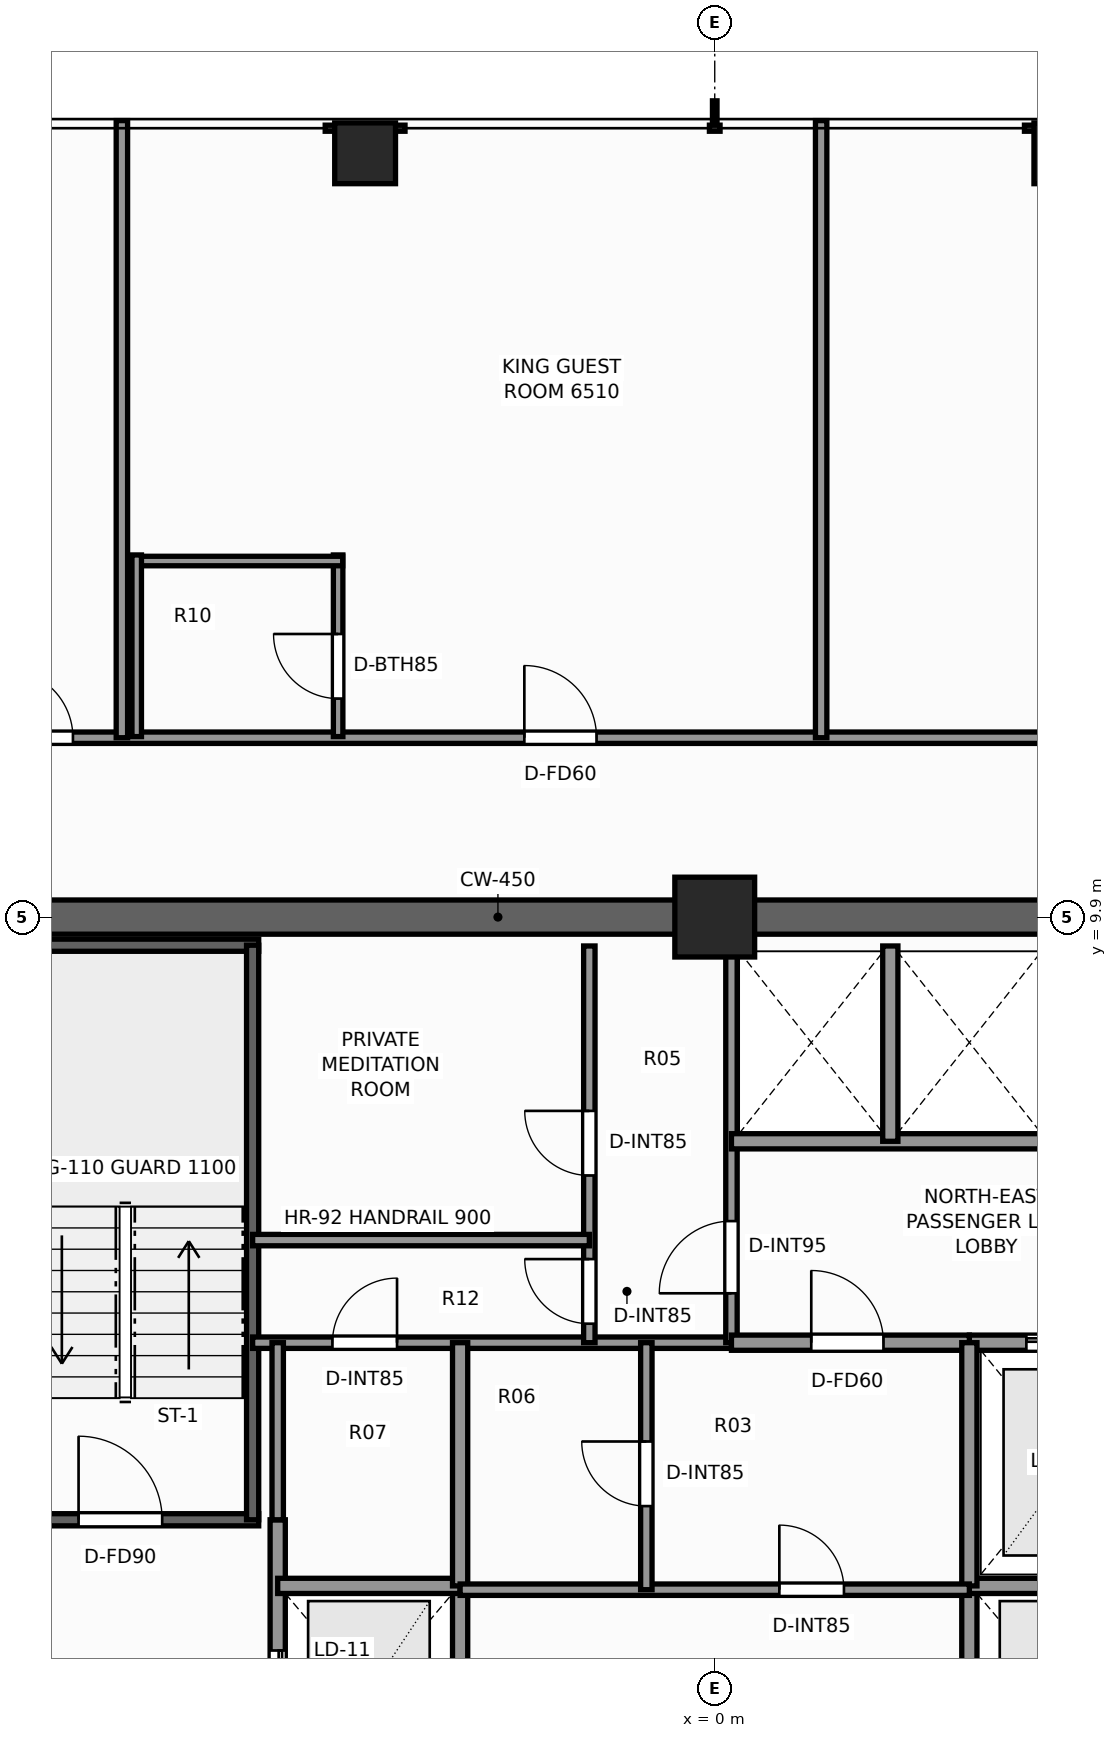
"""IFC4 building model, lengths in metres.
Left out: names, types, materials, properties, quantities, classifications, styles, units other than length and angle.
Written with IfcOpenShell. Run it as: python <this file> out.ifc"""

import sys

from ifc_helpers import new_model, si_unit, direction, frame, frame_2d, origin, origin_2d, place, context, subcontext, project, spatial, rectangle, extrude, element, fill, save


model = new_model("IFC4")
c1 = context("Model", 3, precision=1e-05, world=origin(), true_north=direction((0.0, 1.0)))
c2 = subcontext(c1, "Body", "Model", "MODEL_VIEW")
j1 = project(units=[si_unit("LENGTHUNIT", "METRE"), si_unit("PLANEANGLEUNIT", "RADIAN")], contexts=[c1])
p1 = place(None, origin())
s1 = spatial("IfcSite", under=j1, at=p1, CompositionType="ELEMENT")
p2 = place(p1, origin())
s2 = spatial("IfcBuilding", under=s1, at=p2, CompositionType="ELEMENT")
p3 = place(p2, frame((0.0, 0.0, 222.9)))
s3 = spatial("IfcBuildingStorey", under=s2, at=p3, CompositionType="ELEMENT", Elevation=222.9)
p4 = place(p3, frame((-10.125, 9.9, 0.0), z_axis=(0.0, 0.0, 1.0), x_axis=(1.0, 0.0, 0.0)))
e1 = element("IfcWall", 1, at=p4, inside=s3, PredefinedType="SHEAR", context=c2, shape_type="SweptSolid", body=[
    extrude(rectangle(XDim=14.545, YDim=0.45, at=frame_2d((7.272, 0.0))), origin(), (0.0, 0.0, 1.0), 3.3),
])
p5 = place(p3, frame((0.0, 9.9, 0.0), z_axis=(0.0, 0.0, 1.0), x_axis=(1.0, 0.0, 0.0)))
e2 = element("IfcColumn", 2, at=p5, inside=s3, PredefinedType="COLUMN", context=c2, shape_type="SweptSolid", body=[
    extrude(rectangle(XDim=1.05, YDim=1.05, at=origin_2d()), origin(), (0.0, 0.0, 1.0), 3.3),
])
for number, where, z_axis, x_axis in (
    (3, (-4.6, 19.95, 0.0), (0.0, 0.0, 1.0), (1.0, 0.0, 0.0)),
    (4, (4.6, 19.95, 0.0), (0.0, 0.0, 1.0), (1.0, 0.0, 0.0)),
):
    element("IfcColumn", number, at=place(p3, frame(where, z_axis=z_axis, x_axis=x_axis)), inside=s3, PredefinedType="COLUMN", context=c2, shape_type="SweptSolid", body=[
        extrude(rectangle(XDim=0.8, YDim=0.8, at=origin_2d()), origin(), (0.0, 0.0, 1.0), 3.3),
    ])
p6 = place(p3, frame((-9.52, 1.97, 0.0), z_axis=(0.0, 0.0, 1.0), x_axis=(1.0, 0.0, 0.0)))
e5 = element("IfcWall", 5, at=p6, inside=s3, PredefinedType="SHEAR", context=c2, shape_type="SweptSolid", body=[
    extrude(rectangle(XDim=3.52, YDim=0.16, at=frame_2d((1.76, 0.0))), origin(), (0.0, 0.0, 1.0), 3.3),
])
p7 = place(p6, frame((1.15, 0.0, 0.0)))
e6 = element("IfcOpeningElement", 6, at=p7, cuts=e5, PredefinedType="OPENING", context=c2, shape_type="SweptSolid", body=[
    extrude(rectangle(XDim=1.1, YDim=2.2, at=frame_2d((0.55, 1.1))), frame((0.0, 0.09, 0.0), z_axis=(0.0, -1.0, 0.0), x_axis=(1.0, 0.0, 0.0)), (0.0, 0.0, 1.0), 0.18),
])
p8 = place(p3, frame((-9.52, 9.53, 0.0), z_axis=(0.0, 0.0, 1.0), x_axis=(1.0, 0.0, 0.0)))
e7 = element("IfcWall", 7, at=p8, inside=s3, PredefinedType="SHEAR", context=c2, shape_type="SweptSolid", body=[
    extrude(rectangle(XDim=3.52, YDim=0.16, at=frame_2d((1.76, 0.0))), origin(), (0.0, 0.0, 1.0), 3.3),
])
p9 = place(p3, frame((-6.08, 1.97, 0.0), z_axis=(0.0, 0.0, 1.0), x_axis=(0.0, 1.0, 0.0)))
e8 = element("IfcWall", 8, at=p9, inside=s3, PredefinedType="SHEAR", context=c2, shape_type="SweptSolid", body=[
    extrude(rectangle(XDim=7.56, YDim=0.16, at=frame_2d((3.78, 0.0))), origin(), (0.0, 0.0, 1.0), 3.3),
])
p10 = place(p3, frame((-5.75, -3.6, 0.0), z_axis=(0.0, 0.0, 1.0), x_axis=(0.0, 1.0, 0.0)))
e9 = element("IfcWall", 9, at=p10, inside=s3, PredefinedType="SOLIDWALL", context=c2, shape_type="SweptSolid", body=[
    extrude(rectangle(XDim=5.57, YDim=0.2, at=frame_2d((2.785, 0.0))), origin(), (0.0, 0.0, 1.0), 3.08),
])
p11 = place(p10, frame((2.75, 0.0, 0.0)))
e10 = element("IfcOpeningElement", 10, at=p11, cuts=e9, PredefinedType="OPENING", context=c2, shape_type="SweptSolid", body=[
    extrude(rectangle(XDim=1.1, YDim=2.2, at=frame_2d((0.55, 1.1))), frame((0.0, 0.11, 0.0), z_axis=(0.0, -1.0, 0.0), x_axis=(1.0, 0.0, 0.0)), (0.0, 0.0, 1.0), 0.22),
])
p12 = place(p3, frame((-3.35, -1.7, 0.0), z_axis=(0.0, 0.0, 1.0), x_axis=(0.0, 1.0, 0.0)))
e11 = element("IfcWall", 11, at=p12, inside=s3, PredefinedType="SOLIDWALL", context=c2, shape_type="SweptSolid", body=[
    extrude(rectangle(XDim=2.8, YDim=0.2, at=frame_2d((1.4, 0.0))), origin(), (0.0, 0.0, 1.0), 3.08),
])
p13 = place(p3, frame((-5.75, 1.1, 0.0), z_axis=(0.0, 0.0, 1.0), x_axis=(1.0, 0.0, 0.0)))
e12 = element("IfcWall", 12, at=p13, inside=s3, PredefinedType="SOLIDWALL", context=c2, shape_type="SweptSolid", body=[
    extrude(rectangle(XDim=2.4, YDim=0.2, at=frame_2d((1.2, 0.0))), origin(), (0.0, 0.0, 1.0), 3.08),
])
p14 = place(p3, frame((3.35, -1.7, 0.0), z_axis=(0.0, 0.0, 1.0), x_axis=(0.0, 1.0, 0.0)))
e13 = element("IfcWall", 13, at=p14, inside=s3, PredefinedType="SOLIDWALL", context=c2, shape_type="SweptSolid", body=[
    extrude(rectangle(XDim=2.8, YDim=0.2, at=frame_2d((1.4, 0.0))), origin(), (0.0, 0.0, 1.0), 3.08),
])
p15 = place(p3, frame((3.35, 1.1, 0.0), z_axis=(0.0, 0.0, 1.0), x_axis=(1.0, 0.0, 0.0)))
e14 = element("IfcWall", 14, at=p15, inside=s3, PredefinedType="SOLIDWALL", context=c2, shape_type="SweptSolid", body=[
    extrude(rectangle(XDim=2.4, YDim=0.2, at=frame_2d((1.2, 0.0))), origin(), (0.0, 0.0, 1.0), 3.08),
])
p16 = place(p3, frame((3.35, 4.3, 0.0), z_axis=(0.0, 0.0, 1.0), x_axis=(1.0, 0.0, 0.0)))
e15 = element("IfcWall", 15, at=p16, inside=s3, PredefinedType="SOLIDWALL", context=c2, shape_type="SweptSolid", body=[
    extrude(rectangle(XDim=2.73, YDim=0.2, at=frame_2d((1.365, 0.0))), origin(), (0.0, 0.0, 1.0), 3.08),
])
p17 = place(p16, frame((0.75, 0.0, 0.0)))
e16 = element("IfcOpeningElement", 16, at=p17, cuts=e15, PredefinedType="OPENING", context=c2, shape_type="SweptSolid", body=[
    extrude(rectangle(XDim=1.2, YDim=2.25, at=frame_2d((0.6, 1.125))), frame((0.0, 0.11, 0.0), z_axis=(0.0, -1.0, 0.0), x_axis=(1.0, 0.0, 0.0)), (0.0, 0.0, 1.0), 0.22),
])
p18 = place(p3, frame((-6.08, 4.3, 0.0), z_axis=(0.0, 0.0, 1.0), x_axis=(1.0, 0.0, 0.0)))
e17 = element("IfcWall", 17, at=p18, inside=s3, PredefinedType="PARTITIONING", context=c2, shape_type="SweptSolid", body=[
    extrude(rectangle(XDim=6.3, YDim=0.15, at=frame_2d((3.15, 0.0))), origin(), (0.0, 0.0, 1.0), 3.08),
])
p19 = place(p18, frame((1.05, 0.0, 0.0)))
e18 = element("IfcOpeningElement", 18, at=p19, cuts=e17, PredefinedType="OPENING", context=c2, shape_type="SweptSolid", body=[
    extrude(rectangle(XDim=0.85, YDim=2.03, at=frame_2d((0.425, 1.015))), frame((0.0, 0.085, 0.0), z_axis=(0.0, -1.0, 0.0), x_axis=(1.0, 0.0, 0.0)), (0.0, 0.0, 1.0), 0.17),
])
p20 = place(p3, frame((0.22, 4.3, 0.0), z_axis=(0.0, 0.0, 1.0), x_axis=(0.0, 1.0, 0.0)))
e19 = element("IfcWall", 19, at=p20, inside=s3, PredefinedType="PARTITIONING", context=c2, shape_type="SweptSolid", body=[
    extrude(rectangle(XDim=5.22, YDim=0.15, at=frame_2d((2.61, 0.0))), origin(), (0.0, 0.0, 1.0), 3.08),
])
p21 = place(p20, frame((0.65, 0.0, 0.0)))
e20 = element("IfcOpeningElement", 20, at=p21, cuts=e19, PredefinedType="OPENING", context=c2, shape_type="SweptSolid", body=[
    extrude(rectangle(XDim=0.95, YDim=2.06, at=frame_2d((0.475, 1.03))), frame((0.0, 0.085, 0.0), z_axis=(0.0, -1.0, 0.0), x_axis=(1.0, 0.0, 0.0)), (0.0, 0.0, 1.0), 0.17),
])
p22 = place(p3, frame((-1.65, 4.3, 0.0), z_axis=(0.0, 0.0, 1.0), x_axis=(0.0, 1.0, 0.0)))
e21 = element("IfcWall", 21, at=p22, inside=s3, PredefinedType="PARTITIONING", context=c2, shape_type="SweptSolid", body=[
    extrude(rectangle(XDim=5.22, YDim=0.15, at=frame_2d((2.61, 0.0))), origin(), (0.0, 0.0, 1.0), 3.08),
])
p23 = place(p22, frame((2.2, 0.0, 0.0)))
e22 = element("IfcOpeningElement", 22, at=p23, cuts=e21, PredefinedType="OPENING", context=c2, shape_type="SweptSolid", body=[
    extrude(rectangle(XDim=0.85, YDim=2.03, at=frame_2d((0.425, 1.015))), frame((0.0, 0.085, 0.0), z_axis=(0.0, -1.0, 0.0), x_axis=(1.0, 0.0, 0.0)), (0.0, 0.0, 1.0), 0.17),
])
p24 = place(p22, frame((0.25, 0.0, 0.0)))
e23 = element("IfcOpeningElement", 23, at=p24, cuts=e21, PredefinedType="OPENING", context=c2, shape_type="SweptSolid", body=[
    extrude(rectangle(XDim=0.85, YDim=2.03, at=frame_2d((0.425, 1.015))), frame((0.0, 0.085, 0.0), z_axis=(0.0, -1.0, 0.0), x_axis=(1.0, 0.0, 0.0)), (0.0, 0.0, 1.0), 0.17),
])
p25 = place(p3, frame((-6.08, 5.65, 0.0), z_axis=(0.0, 0.0, 1.0), x_axis=(1.0, 0.0, 0.0)))
e24 = element("IfcWall", 24, at=p25, inside=s3, PredefinedType="PARTITIONING", context=c2, shape_type="SweptSolid", body=[
    extrude(rectangle(XDim=4.43, YDim=0.15, at=frame_2d((2.215, 0.0))), origin(), (0.0, 0.0, 1.0), 3.08),
])
p26 = place(p3, frame((0.22, 6.95, 0.0), z_axis=(0.0, 0.0, 1.0), x_axis=(1.0, 0.0, 0.0)))
e25 = element("IfcWall", 25, at=p26, inside=s3, PredefinedType="SOLIDWALL", context=c2, shape_type="SweptSolid", body=[
    extrude(rectangle(XDim=4.18, YDim=0.2, at=frame_2d((2.09, 0.0))), origin(), (0.0, 0.0, 1.0), 3.08),
])
p27 = place(p3, frame((2.31, 6.95, 0.0), z_axis=(0.0, 0.0, 1.0), x_axis=(0.0, 1.0, 0.0)))
e26 = element("IfcWall", 26, at=p27, inside=s3, PredefinedType="SOLIDWALL", context=c2, shape_type="SweptSolid", body=[
    extrude(rectangle(XDim=2.57, YDim=0.2, at=frame_2d((1.285, 0.0))), origin(), (0.0, 0.0, 1.0), 3.08),
])
p28 = place(p3, frame((0.22, 4.3, 0.0), z_axis=(0.0, 0.0, 1.0), x_axis=(1.0, 0.0, 0.0)))
e27 = element("IfcWall", 27, at=p28, inside=s3, PredefinedType="SOLIDWALL", context=c2, shape_type="SweptSolid", body=[
    extrude(rectangle(XDim=3.13, YDim=0.2, at=frame_2d((1.565, 0.0))), origin(), (0.0, 0.0, 1.0), 3.08),
])
p29 = place(p28, frame((1.05, 0.0, 0.0)))
e28 = element("IfcOpeningElement", 28, at=p29, cuts=e27, PredefinedType="OPENING", context=c2, shape_type="SweptSolid", body=[
    extrude(rectangle(XDim=0.95, YDim=2.06, at=frame_2d((0.475, 1.03))), frame((0.0, 0.11, 0.0), z_axis=(0.0, -1.0, 0.0), x_axis=(1.0, 0.0, 0.0)), (0.0, 0.0, 1.0), 0.22),
])
for number, where, z_axis, x_axis in (
    (29, (-3.35, 1.1, 0.0), (0.0, 0.0, 1.0), (0.0, 1.0, 0.0)),
    (30, (3.35, 1.1, 0.0), (0.0, 0.0, 1.0), (0.0, 1.0, 0.0)),
):
    element("IfcWall", number, at=place(p3, frame(where, z_axis=z_axis, x_axis=x_axis)), inside=s3, PredefinedType="SOLIDWALL", context=c2, shape_type="SweptSolid", body=[
        extrude(rectangle(XDim=3.2, YDim=0.2, at=frame_2d((1.6, 0.0))), origin(), (0.0, 0.0, 1.0), 3.08),
    ])
p30 = place(p3, frame((-3.35, 1.05, 0.0), z_axis=(0.0, 0.0, 1.0), x_axis=(1.0, 0.0, 0.0)))
e31 = element("IfcWall", 31, at=p30, inside=s3, PredefinedType="PARTITIONING", context=c2, shape_type="SweptSolid", body=[
    extrude(rectangle(XDim=6.7, YDim=0.15, at=frame_2d((3.35, 0.0))), origin(), (0.0, 0.0, 1.0), 3.08),
])
p31 = place(p30, frame((4.2, 0.0, 0.0)))
e32 = element("IfcOpeningElement", 32, at=p31, cuts=e31, PredefinedType="OPENING", context=c2, shape_type="SweptSolid", body=[
    extrude(rectangle(XDim=0.85, YDim=2.03, at=frame_2d((0.425, 1.015))), frame((0.0, 0.085, 0.0), z_axis=(0.0, -1.0, 0.0), x_axis=(1.0, 0.0, 0.0)), (0.0, 0.0, 1.0), 0.17),
])
p32 = place(p3, frame((-0.9, 1.05, 0.0), z_axis=(0.0, 0.0, 1.0), x_axis=(0.0, 1.0, 0.0)))
e33 = element("IfcWall", 33, at=p32, inside=s3, PredefinedType="PARTITIONING", context=c2, shape_type="SweptSolid", body=[
    extrude(rectangle(XDim=3.25, YDim=0.15, at=frame_2d((1.625, 0.0))), origin(), (0.0, 0.0, 1.0), 3.08),
])
p33 = place(p32, frame((1.1, 0.0, 0.0)))
e34 = element("IfcOpeningElement", 34, at=p33, cuts=e33, PredefinedType="OPENING", context=c2, shape_type="SweptSolid", body=[
    extrude(rectangle(XDim=0.85, YDim=2.03, at=frame_2d((0.425, 1.015))), frame((0.0, 0.085, 0.0), z_axis=(0.0, -1.0, 0.0), x_axis=(1.0, 0.0, 0.0)), (0.0, 0.0, 1.0), 0.17),
])
p34 = place(p3, frame((-5.75, 1.97, 0.0), z_axis=(0.0, 0.0, 1.0), x_axis=(0.0, 1.0, 0.0)))
e35 = element("IfcWall", 35, at=p34, inside=s3, PredefinedType="PARTITIONING", context=c2, shape_type="SweptSolid", body=[
    extrude(rectangle(XDim=2.33, YDim=0.15, at=frame_2d((1.165, 0.0))), origin(), (0.0, 0.0, 1.0), 3.08),
])
p35 = place(p3, frame((-12.26, 12.26, 0.0), z_axis=(0.0, 0.0, 1.0), x_axis=(1.0, 0.0, 0.0)))
e36 = element("IfcWall", 36, at=p35, inside=s3, PredefinedType="PARTITIONING", context=c2, shape_type="SweptSolid", body=[
    extrude(rectangle(XDim=24.52, YDim=0.15, at=frame_2d((12.26, 0.0))), origin(), (0.0, 0.0, 1.0), 2.369),
])
p36 = place(p35, frame((2.916, 0.0, 0.0)))
e37 = element("IfcOpeningElement", 37, at=p36, cuts=e36, PredefinedType="OPENING", context=c2, shape_type="SweptSolid", body=[
    extrude(rectangle(XDim=0.9, YDim=2.06, at=frame_2d((0.45, 1.03))), frame((0.0, 0.085, 0.0), z_axis=(0.0, -1.0, 0.0), x_axis=(1.0, 0.0, 0.0)), (0.0, 0.0, 1.0), 0.17),
])
p37 = place(p35, frame((9.755, 0.0, 0.0)))
e38 = element("IfcOpeningElement", 38, at=p37, cuts=e36, PredefinedType="OPENING", context=c2, shape_type="SweptSolid", body=[
    extrude(rectangle(XDim=0.95, YDim=2.06, at=frame_2d((0.475, 1.03))), frame((0.0, 0.085, 0.0), z_axis=(0.0, -1.0, 0.0), x_axis=(1.0, 0.0, 0.0)), (0.0, 0.0, 1.0), 0.17),
])
p38 = place(p35, frame((19.345, 0.0, 0.0)))
e39 = element("IfcOpeningElement", 39, at=p38, cuts=e36, PredefinedType="OPENING", context=c2, shape_type="SweptSolid", body=[
    extrude(rectangle(XDim=0.9, YDim=2.06, at=frame_2d((0.45, 1.03))), frame((0.0, 0.085, 0.0), z_axis=(0.0, -1.0, 0.0), x_axis=(1.0, 0.0, 0.0)), (0.0, 0.0, 1.0), 0.17),
])
for number, where, z_axis, x_axis in (
    (40, (-7.8, 12.26, 0.0), (0.0, 0.0, 1.0), (0.0, 1.0, 0.0)),
    (41, (1.4, 12.26, 0.0), (0.0, 0.0, 1.0), (0.0, 1.0, 0.0)),
):
    element("IfcWall", number, at=place(p3, frame(where, z_axis=z_axis, x_axis=x_axis)), inside=s3, PredefinedType="PARTITIONING", context=c2, shape_type="SweptSolid", body=[
        extrude(rectangle(XDim=8.12, YDim=0.15, at=frame_2d((4.06, 0.0))), origin(), (0.0, 0.0, 1.0), 2.453),
    ])
p39 = place(p3, frame((-4.955, 12.275, 0.0), z_axis=(0.0, 0.0, 1.0), x_axis=(0.0, 1.0, 0.0)))
e42 = element("IfcWall", 42, at=p39, inside=s3, PredefinedType="PARTITIONING", context=c2, shape_type="SweptSolid", body=[
    extrude(rectangle(XDim=2.39, YDim=0.125, at=frame_2d((1.195, 0.0))), origin(), (0.0, 0.0, 1.0), 3.08),
])
p40 = place(p39, frame((0.5, 0.0, 0.0)))
e43 = element("IfcOpeningElement", 43, at=p40, cuts=e42, PredefinedType="OPENING", context=c2, shape_type="SweptSolid", body=[
    extrude(rectangle(XDim=0.85, YDim=2.03, at=frame_2d((0.425, 1.015))), frame((0.0, 0.073, 0.0), z_axis=(0.0, -1.0, 0.0), x_axis=(1.0, 0.0, 0.0)), (0.0, 0.0, 1.0), 0.145),
])
p41 = place(p3, frame((-7.665, 14.585, 0.0), z_axis=(0.0, 0.0, 1.0), x_axis=(1.0, 0.0, 0.0)))
e44 = element("IfcWall", 44, at=p41, inside=s3, PredefinedType="PARTITIONING", context=c2, shape_type="SweptSolid", body=[
    extrude(rectangle(XDim=2.77, YDim=0.125, at=frame_2d((1.385, 0.0))), origin(), (0.0, 0.0, 1.0), 3.08),
])
p42 = place(p3, frame((-7.605, 12.275, 0.0), z_axis=(0.0, 0.0, 1.0), x_axis=(0.0, 1.0, 0.0)))
e45 = element("IfcWall", 45, at=p42, inside=s3, PredefinedType="PARTITIONING", context=c2, shape_type="SweptSolid", body=[
    extrude(rectangle(XDim=2.39, YDim=0.125, at=frame_2d((1.195, 0.0))), origin(), (0.0, 0.0, 1.0), 3.08),
])
p43 = place(p7, origin())
e46 = element("IfcDoor", 46, at=p43, inside=s3, OperationType="SINGLE_SWING_LEFT", PredefinedType="DOOR", context=c2, shape_type="SweptSolid", body=[
    extrude(rectangle(XDim=1.1, YDim=2.2, at=frame_2d((0.55, 1.1))), frame((0.0, 0.025, 0.0), z_axis=(0.0, -1.0, 0.0), x_axis=(1.0, 0.0, 0.0)), (0.0, 0.0, 1.0), 0.05),
])
fill(e6, e46)
p44 = place(p11, origin())
e47 = element("IfcDoor", 47, at=p44, inside=s3, OperationType="DOUBLE_DOOR_SLIDING", PredefinedType="DOOR", context=c2, shape_type="SweptSolid", body=[
    extrude(rectangle(XDim=1.1, YDim=2.2, at=frame_2d((0.55, 1.1))), frame((0.0, 0.025, 0.0), z_axis=(0.0, -1.0, 0.0), x_axis=(1.0, 0.0, 0.0)), (0.0, 0.0, 1.0), 0.05),
])
fill(e10, e47)
p45 = place(p17, origin())
e48 = element("IfcDoor", 48, at=p45, inside=s3, OperationType="DOUBLE_DOOR_SLIDING", PredefinedType="DOOR", context=c2, shape_type="SweptSolid", body=[
    extrude(rectangle(XDim=1.2, YDim=2.25, at=frame_2d((0.6, 1.125))), frame((0.0, 0.025, 0.0), z_axis=(0.0, -1.0, 0.0), x_axis=(1.0, 0.0, 0.0)), (0.0, 0.0, 1.0), 0.05),
])
fill(e16, e48)
p46 = place(p21, origin())
e49 = element("IfcDoor", 49, at=p46, inside=s3, OperationType="SINGLE_SWING_LEFT", PredefinedType="DOOR", context=c2, shape_type="SweptSolid", body=[
    extrude(rectangle(XDim=0.95, YDim=2.06, at=frame_2d((0.475, 1.03))), frame((0.0, 0.025, 0.0), z_axis=(0.0, -1.0, 0.0), x_axis=(1.0, 0.0, 0.0)), (0.0, 0.0, 1.0), 0.05),
])
fill(e20, e49)
p47 = place(p23, origin())
e50 = element("IfcDoor", 50, at=p47, inside=s3, OperationType="SINGLE_SWING_RIGHT", PredefinedType="DOOR", context=c2, shape_type="SweptSolid", body=[
    extrude(rectangle(XDim=0.85, YDim=2.03, at=frame_2d((0.425, 1.015))), frame((0.0, 0.025, 0.0), z_axis=(0.0, -1.0, 0.0), x_axis=(1.0, 0.0, 0.0)), (0.0, 0.0, 1.0), 0.05),
])
fill(e22, e50)
p48 = place(p24, origin())
e51 = element("IfcDoor", 51, at=p48, inside=s3, OperationType="SINGLE_SWING_RIGHT", PredefinedType="DOOR", context=c2, shape_type="SweptSolid", body=[
    extrude(rectangle(XDim=0.85, YDim=2.03, at=frame_2d((0.425, 1.015))), frame((0.0, 0.025, 0.0), z_axis=(0.0, -1.0, 0.0), x_axis=(1.0, 0.0, 0.0)), (0.0, 0.0, 1.0), 0.05),
])
fill(e23, e51)
p49 = place(p29, origin())
e52 = element("IfcDoor", 52, at=p49, inside=s3, OperationType="SINGLE_SWING_LEFT", PredefinedType="DOOR", context=c2, shape_type="SweptSolid", body=[
    extrude(rectangle(XDim=0.95, YDim=2.06, at=frame_2d((0.475, 1.03))), frame((0.0, 0.025, 0.0), z_axis=(0.0, -1.0, 0.0), x_axis=(1.0, 0.0, 0.0)), (0.0, 0.0, 1.0), 0.05),
])
fill(e28, e52)
p50 = place(p31, origin())
e53 = element("IfcDoor", 53, at=p50, inside=s3, OperationType="SINGLE_SWING_LEFT", PredefinedType="DOOR", context=c2, shape_type="SweptSolid", body=[
    extrude(rectangle(XDim=0.85, YDim=2.03, at=frame_2d((0.425, 1.015))), frame((0.0, 0.025, 0.0), z_axis=(0.0, -1.0, 0.0), x_axis=(1.0, 0.0, 0.0)), (0.0, 0.0, 1.0), 0.05),
])
fill(e32, e53)
p51 = place(p33, origin())
e54 = element("IfcDoor", 54, at=p51, inside=s3, OperationType="SINGLE_SWING_RIGHT", PredefinedType="DOOR", context=c2, shape_type="SweptSolid", body=[
    extrude(rectangle(XDim=0.85, YDim=2.03, at=frame_2d((0.425, 1.015))), frame((0.0, 0.025, 0.0), z_axis=(0.0, -1.0, 0.0), x_axis=(1.0, 0.0, 0.0)), (0.0, 0.0, 1.0), 0.05),
])
fill(e34, e54)
p52 = place(p19, origin())
e55 = element("IfcDoor", 55, at=p52, inside=s3, OperationType="SINGLE_SWING_RIGHT", PredefinedType="DOOR", context=c2, shape_type="SweptSolid", body=[
    extrude(rectangle(XDim=0.85, YDim=2.03, at=frame_2d((0.425, 1.015))), frame((0.0, 0.025, 0.0), z_axis=(0.0, -1.0, 0.0), x_axis=(1.0, 0.0, 0.0)), (0.0, 0.0, 1.0), 0.05),
])
fill(e18, e55)
p53 = place(p36, origin())
e56 = element("IfcDoor", 56, at=p53, inside=s3, OperationType="SINGLE_SWING_LEFT", PredefinedType="DOOR", context=c2, shape_type="SweptSolid", body=[
    extrude(rectangle(XDim=0.9, YDim=2.06, at=frame_2d((0.45, 1.03))), frame((0.0, 0.025, 0.0), z_axis=(0.0, -1.0, 0.0), x_axis=(1.0, 0.0, 0.0)), (0.0, 0.0, 1.0), 0.05),
])
fill(e37, e56)
p54 = place(p40, origin())
e57 = element("IfcDoor", 57, at=p54, inside=s3, OperationType="SINGLE_SWING_RIGHT", PredefinedType="DOOR", context=c2, shape_type="SweptSolid", body=[
    extrude(rectangle(XDim=0.85, YDim=2.03, at=frame_2d((0.425, 1.015))), frame((0.0, 0.025, 0.0), z_axis=(0.0, -1.0, 0.0), x_axis=(1.0, 0.0, 0.0)), (0.0, 0.0, 1.0), 0.05),
])
fill(e43, e57)
p55 = place(p37, origin())
e58 = element("IfcDoor", 58, at=p55, inside=s3, OperationType="SINGLE_SWING_LEFT", PredefinedType="DOOR", context=c2, shape_type="SweptSolid", body=[
    extrude(rectangle(XDim=0.95, YDim=2.06, at=frame_2d((0.475, 1.03))), frame((0.0, 0.025, 0.0), z_axis=(0.0, -1.0, 0.0), x_axis=(1.0, 0.0, 0.0)), (0.0, 0.0, 1.0), 0.05),
])
fill(e38, e58)
save(model, sys.argv[1])
